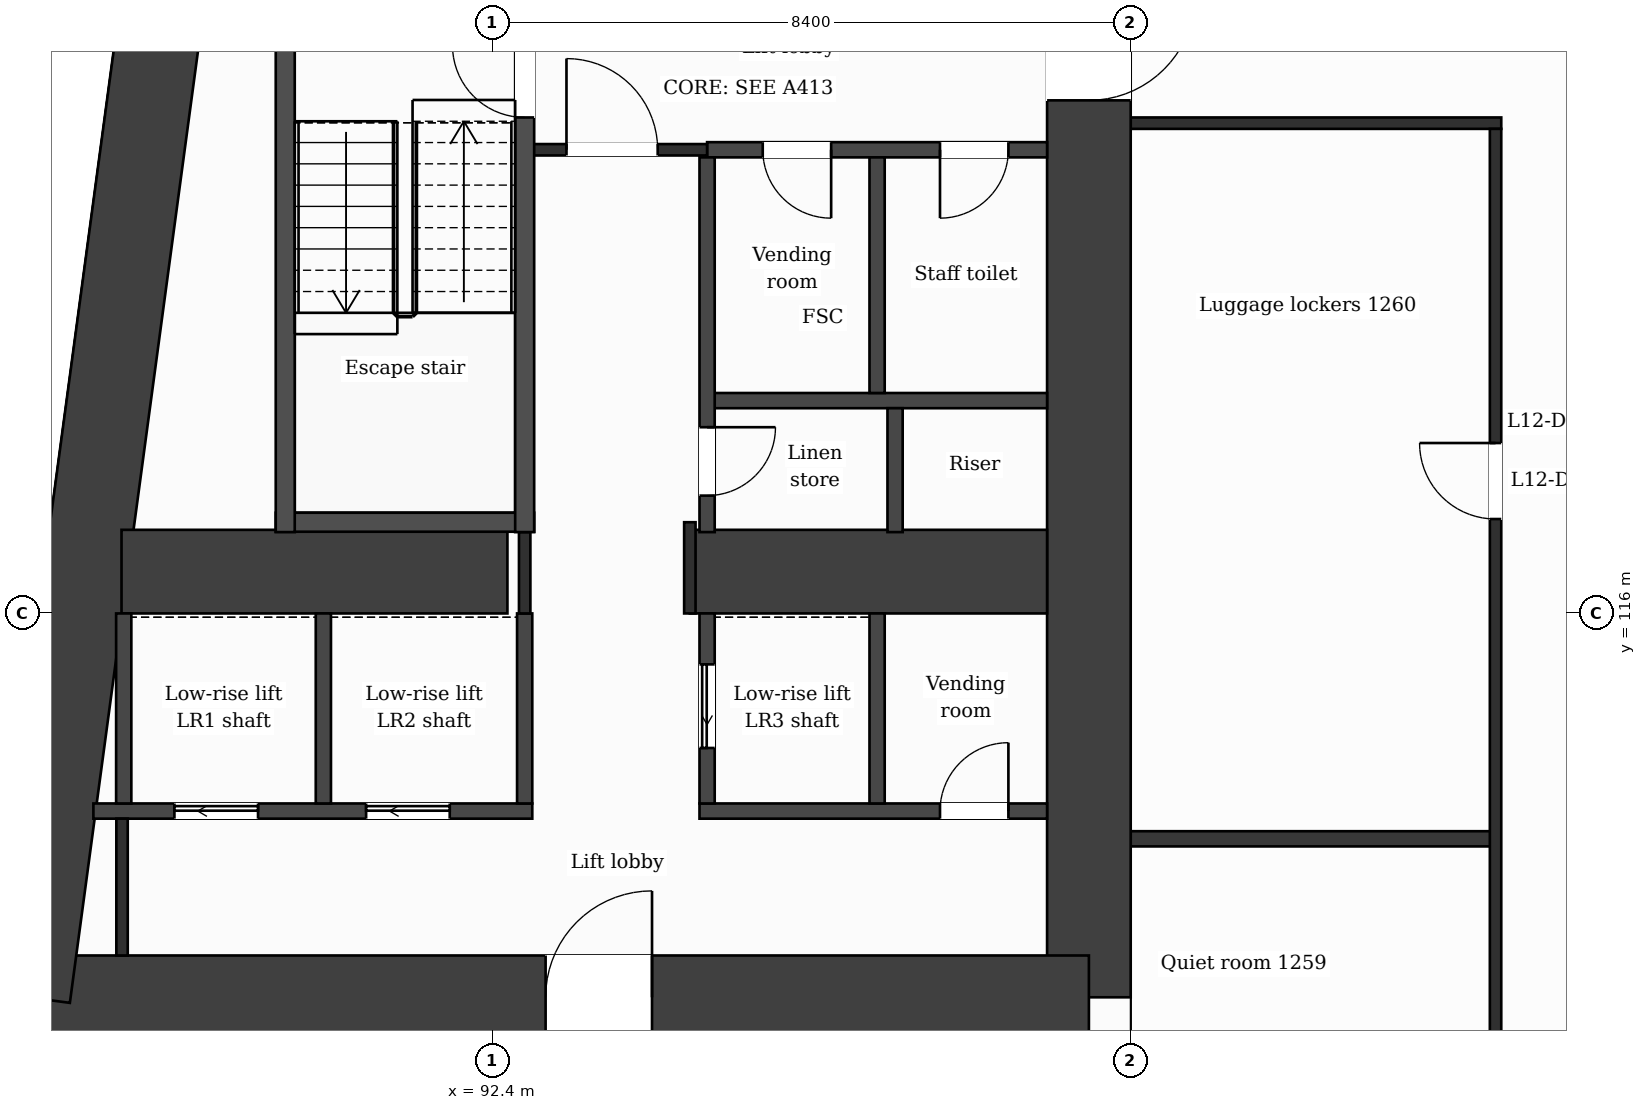
"""IFC4 building model, lengths in metres.
Left out: names, types, materials, properties, quantities, classifications, styles, units other than length and angle.
Written with IfcOpenShell. Run it as: python <this file> out.ifc"""

import sys

from ifc_helpers import new_model, si_unit, direction, frame, frame_2d, origin, place, context, subcontext, project, spatial, rectangle, extrude, element, fill, save


model = new_model("IFC4")
c1 = context("Model", 3, precision=1e-05, world=origin(), true_north=direction((0.0, 1.0)))
c2 = subcontext(c1, "Body", "Model", "MODEL_VIEW")
j1 = project(units=[si_unit("LENGTHUNIT", "METRE"), si_unit("PLANEANGLEUNIT", "RADIAN")], contexts=[c1])
p1 = place(None, origin())
s1 = spatial("IfcSite", under=j1, at=p1, CompositionType="ELEMENT")
p2 = place(p1, origin())
s2 = spatial("IfcBuilding", under=s1, at=p2, CompositionType="ELEMENT")
p3 = place(p2, frame((0.0, 0.0, 60.0)))
s3 = spatial("IfcBuildingStorey", under=s2, at=p3, CompositionType="ELEMENT", Elevation=60.0)
p4 = place(p3, frame((100.25, 131.85, 0.0), z_axis=(0.0, 0.0, 1.0), x_axis=(0.0, -1.0, 0.0)))
e1 = element("IfcWall", 1, at=p4, inside=s3, PredefinedType="SHEAR", context=c2, shape_type="SweptSolid", body=[
    extrude(rectangle(XDim=20.9, YDim=1.1, at=frame_2d((10.45, 0.0))), origin(), (0.0, 0.0, 1.0), 3.5),
])
p5 = place(p4, frame((7.7, 0.0, 0.0)))
e2 = element("IfcOpeningElement", 2, at=p5, cuts=e1, PredefinedType="OPENING", context=c2, shape_type="SweptSolid", body=[
    extrude(rectangle(XDim=1.4, YDim=2.1, at=frame_2d((0.7, 1.05))), frame((0.0, 0.56, 0.0), z_axis=(0.0, -1.0, 0.0), x_axis=(1.0, 0.0, 0.0)), (0.0, 0.0, 1.0), 1.12),
])
p6 = place(p3, frame((100.25, 110.95, 0.0), z_axis=(0.0, 0.0, 1.0), x_axis=(-1.0, 0.0, 0.0)))
e3 = element("IfcWall", 3, at=p6, inside=s3, PredefinedType="SHEAR", context=c2, shape_type="SweptSolid", body=[
    extrude(rectangle(XDim=13.952, YDim=1.1, at=frame_2d((6.976, 0.0))), origin(), (0.0, 0.0, 1.0), 3.5),
])
p7 = place(p6, frame((5.748, 0.0, 0.0)))
e4 = element("IfcOpeningElement", 4, at=p7, cuts=e3, PredefinedType="OPENING", context=c2, shape_type="SweptSolid", body=[
    extrude(rectangle(XDim=1.4, YDim=2.1, at=frame_2d((0.7, 1.05))), frame((0.0, 0.56, 0.0), z_axis=(0.0, -1.0, 0.0), x_axis=(1.0, 0.0, 0.0)), (0.0, 0.0, 1.0), 1.12),
])
p8 = place(p3, frame((86.298, 110.95, 0.0), z_axis=(0.0, 0.0, 1.0), x_axis=(0.133400422634, 0.99106222168, 0.0)))
e5 = element("IfcWall", 5, at=p8, inside=s3, PredefinedType="SHEAR", context=c2, shape_type="SweptSolid", body=[
    extrude(rectangle(XDim=21.089, YDim=1.1, at=frame_2d((10.544, 0.0))), origin(), (0.0, 0.0, 1.0), 3.5),
])
p9 = place(p3, frame((87.523, 116.55, 0.0), z_axis=(0.0, 0.0, 1.0), x_axis=(1.0, 0.0, 0.0)))
e6 = element("IfcWall", 6, at=p9, inside=s3, PredefinedType="SHEAR", context=c2, shape_type="SweptSolid", body=[
    extrude(rectangle(XDim=5.077, YDim=1.1, at=frame_2d((2.539, 0.0))), origin(), (0.0, 0.0, 1.0), 3.5),
])
p10 = place(p3, frame((95.0, 116.55, 0.0), z_axis=(0.0, 0.0, 1.0), x_axis=(1.0, 0.0, 0.0)))
e7 = element("IfcWall", 7, at=p10, inside=s3, PredefinedType="SHEAR", context=c2, shape_type="SweptSolid", body=[
    extrude(rectangle(XDim=4.7, YDim=1.1, at=frame_2d((2.35, 0.0))), origin(), (0.0, 0.0, 1.0), 3.5),
])
p11 = place(p3, frame((100.8, 113.035, 0.0), z_axis=(0.0, 0.0, 1.0), x_axis=(1.0, 0.0, 0.0)))
e8 = element("IfcWall", 8, at=p11, inside=s3, PredefinedType="PARTITIONING", context=c2, shape_type="SweptSolid", body=[
    extrude(rectangle(XDim=4.8, YDim=0.2, at=frame_2d((2.4, 0.0))), origin(), (0.0, 0.0, 1.0), 3.18),
])
p12 = place(p3, frame((87.153, 113.4, 0.0), z_axis=(0.0, 0.0, 1.0), x_axis=(1.0, 0.0, 0.0)))
e9 = element("IfcWall", 9, at=p12, inside=s3, PredefinedType="PARTITIONING", context=c2, shape_type="SweptSolid", body=[
    extrude(rectangle(XDim=5.774, YDim=0.2, at=frame_2d((2.887, 0.0))), origin(), (0.0, 0.0, 1.0), 3.18),
])
p13 = place(p12, frame((1.066, 0.0, 0.0)))
e10 = element("IfcOpeningElement", 10, at=p13, cuts=e9, PredefinedType="OPENING", context=c2, shape_type="SweptSolid", body=[
    extrude(rectangle(XDim=1.1, YDim=2.1, at=frame_2d((0.55, 1.05))), frame((0.0, 0.11, 0.0), z_axis=(0.0, -1.0, 0.0), x_axis=(1.0, 0.0, 0.0)), (0.0, 0.0, 1.0), 0.22),
])
p14 = place(p12, frame((3.588, 0.0, 0.0)))
e11 = element("IfcOpeningElement", 11, at=p14, cuts=e9, PredefinedType="OPENING", context=c2, shape_type="SweptSolid", body=[
    extrude(rectangle(XDim=1.1, YDim=2.1, at=frame_2d((0.55, 1.05))), frame((0.0, 0.11, 0.0), z_axis=(0.0, -1.0, 0.0), x_axis=(1.0, 0.0, 0.0)), (0.0, 0.0, 1.0), 0.22),
])
p15 = place(p3, frame((95.127, 113.4, 0.0), z_axis=(0.0, 0.0, 1.0), x_axis=(1.0, 0.0, 0.0)))
e12 = element("IfcWall", 12, at=p15, inside=s3, PredefinedType="PARTITIONING", context=c2, shape_type="SweptSolid", body=[
    extrude(rectangle(XDim=4.573, YDim=0.2, at=frame_2d((2.287, 0.0))), origin(), (0.0, 0.0, 1.0), 3.18),
])
p16 = place(p15, frame((3.164, 0.0, 0.0)))
e13 = element("IfcOpeningElement", 13, at=p16, cuts=e12, PredefinedType="OPENING", context=c2, shape_type="SweptSolid", body=[
    extrude(rectangle(XDim=0.9, YDim=2.1, at=frame_2d((0.45, 1.05))), frame((0.0, 0.11, 0.0), z_axis=(0.0, -1.0, 0.0), x_axis=(1.0, 0.0, 0.0)), (0.0, 0.0, 1.0), 0.22),
])
p17 = place(p3, frame((89.552, 117.2, 0.0), z_axis=(0.0, 0.0, 1.0), x_axis=(1.0, 0.0, 0.0)))
e14 = element("IfcWall", 14, at=p17, inside=s3, PredefinedType="PARTITIONING", context=c2, shape_type="SweptSolid", body=[
    extrude(rectangle(XDim=3.4, YDim=0.25, at=frame_2d((1.7, 0.0))), origin(), (0.0, 0.0, 1.0), 3.18),
])
p18 = place(p3, frame((95.227, 118.8, 0.0), z_axis=(0.0, 0.0, 1.0), x_axis=(1.0, 0.0, 0.0)))
e15 = element("IfcWall", 15, at=p18, inside=s3, PredefinedType="PARTITIONING", context=c2, shape_type="SweptSolid", body=[
    extrude(rectangle(XDim=4.473, YDim=0.2, at=frame_2d((2.236, 0.0))), origin(), (0.0, 0.0, 1.0), 3.18),
])
p19 = place(p3, frame((95.227, 122.1, 0.0), z_axis=(0.0, 0.0, 1.0), x_axis=(1.0, 0.0, 0.0)))
e16 = element("IfcWall", 16, at=p19, inside=s3, PredefinedType="PARTITIONING", context=c2, shape_type="SweptSolid", body=[
    extrude(rectangle(XDim=4.473, YDim=0.2, at=frame_2d((2.236, 0.0))), origin(), (0.0, 0.0, 1.0), 3.18),
])
p20 = place(p19, frame((0.732, 0.0, 0.0)))
e17 = element("IfcOpeningElement", 17, at=p20, cuts=e16, PredefinedType="OPENING", context=c2, shape_type="SweptSolid", body=[
    extrude(rectangle(XDim=0.9, YDim=2.1, at=frame_2d((0.45, 1.05))), frame((0.0, 0.11, 0.0), z_axis=(0.0, -1.0, 0.0), x_axis=(1.0, 0.0, 0.0)), (0.0, 0.0, 1.0), 0.22),
])
p21 = place(p19, frame((3.064, 0.0, 0.0)))
e18 = element("IfcOpeningElement", 18, at=p21, cuts=e16, PredefinedType="OPENING", context=c2, shape_type="SweptSolid", body=[
    extrude(rectangle(XDim=0.9, YDim=2.1, at=frame_2d((0.45, 1.05))), frame((0.0, 0.11, 0.0), z_axis=(0.0, -1.0, 0.0), x_axis=(1.0, 0.0, 0.0)), (0.0, 0.0, 1.0), 0.22),
])
p22 = place(p3, frame((92.827, 122.1, 0.0), z_axis=(0.0, 0.0, 1.0), x_axis=(1.0, 0.0, 0.0)))
e19 = element("IfcWall", 19, at=p22, inside=s3, PredefinedType="PARTITIONING", context=c2, shape_type="SweptSolid", body=[
    extrude(rectangle(XDim=2.4, YDim=0.15, at=frame_2d((1.2, 0.0))), origin(), (0.0, 0.0, 1.0), 3.18),
])
p23 = place(p22, frame((0.55, 0.0, 0.0)))
e20 = element("IfcOpeningElement", 20, at=p23, cuts=e19, PredefinedType="OPENING", context=c2, shape_type="SweptSolid", body=[
    extrude(rectangle(XDim=1.2, YDim=2.1, at=frame_2d((0.6, 1.05))), frame((0.0, 0.085, 0.0), z_axis=(0.0, -1.0, 0.0), x_axis=(1.0, 0.0, 0.0)), (0.0, 0.0, 1.0), 0.17),
])
p24 = place(p3, frame((100.8, 122.45, 0.0), z_axis=(0.0, 0.0, 1.0), x_axis=(1.0, 0.0, 0.0)))
e21 = element("IfcWall", 21, at=p24, inside=s3, PredefinedType="PARTITIONING", context=c2, shape_type="SweptSolid", body=[
    extrude(rectangle(XDim=4.875, YDim=0.15, at=frame_2d((2.438, 0.0))), origin(), (0.0, 0.0, 1.0), 3.18),
])
p25 = place(p3, frame((87.552, 113.5, 0.0), z_axis=(0.0, 0.0, 1.0), x_axis=(0.0, 1.0, 0.0)))
e22 = element("IfcWall", 22, at=p25, inside=s3, PredefinedType="PARTITIONING", context=c2, shape_type="SweptSolid", body=[
    extrude(rectangle(XDim=2.5, YDim=0.2, at=frame_2d((1.25, 0.0))), origin(), (0.0, 0.0, 1.0), 3.18),
])
p26 = place(p3, frame((87.53, 111.5, 0.0), z_axis=(0.0, 0.0, 1.0), x_axis=(0.0, 1.0, 0.0)))
e23 = element("IfcWall", 23, at=p26, inside=s3, PredefinedType="PARTITIONING", context=c2, shape_type="SweptSolid", body=[
    extrude(rectangle(XDim=1.8, YDim=0.15, at=frame_2d((0.9, 0.0))), origin(), (0.0, 0.0, 1.0), 3.18),
])
p27 = place(p3, frame((89.677, 117.07, 0.0), z_axis=(0.0, 0.0, 1.0), x_axis=(0.0, 1.0, 0.0)))
e24 = element("IfcWall", 24, at=p27, inside=s3, PredefinedType="PARTITIONING", context=c2, shape_type="SweptSolid", body=[
    extrude(rectangle(XDim=6.755, YDim=0.25, at=frame_2d((3.377, 0.0))), origin(), (0.0, 0.0, 1.0), 3.18),
])
for number, where, z_axis, x_axis in (
    (25, (90.178, 113.5, 0.0), (0.0, 0.0, 1.0), (0.0, 1.0, 0.0)),
    (26, (92.827, 113.5, 0.0), (0.0, 0.0, 1.0), (0.0, 1.0, 0.0)),
):
    element("IfcWall", number, at=place(p3, frame(where, z_axis=z_axis, x_axis=x_axis)), inside=s3, PredefinedType="PARTITIONING", context=c2, shape_type="SweptSolid", body=[
        extrude(rectangle(XDim=2.5, YDim=0.2, at=frame_2d((1.25, 0.0))), origin(), (0.0, 0.0, 1.0), 3.18),
    ])
p28 = place(p3, frame((92.827, 116.0, 0.0), z_axis=(0.0, 0.0, 1.0), x_axis=(0.0, 1.0, 0.0)))
e27 = element("IfcWall", 27, at=p28, inside=s3, PredefinedType="PARTITIONING", context=c2, shape_type="SweptSolid", body=[
    extrude(rectangle(XDim=1.07, YDim=0.15, at=frame_2d((0.535, 0.0))), origin(), (0.0, 0.0, 1.0), 3.18),
])
p29 = place(p3, frame((92.827, 117.07, 0.0), z_axis=(0.0, 0.0, 1.0), x_axis=(0.0, 1.0, 0.0)))
e28 = element("IfcWall", 28, at=p29, inside=s3, PredefinedType="PARTITIONING", context=c2, shape_type="SweptSolid", body=[
    extrude(rectangle(XDim=6.755, YDim=0.25, at=frame_2d((3.377, 0.0))), origin(), (0.0, 0.0, 1.0), 3.18),
])
p30 = place(p29, frame((5.455, 0.0, 0.0)))
e29 = element("IfcOpeningElement", 29, at=p30, cuts=e28, PredefinedType="OPENING", context=c2, shape_type="SweptSolid", body=[
    extrude(rectangle(XDim=0.95, YDim=2.1, at=frame_2d((0.475, 1.05))), frame((0.0, 0.135, 0.0), z_axis=(0.0, -1.0, 0.0), x_axis=(1.0, 0.0, 0.0)), (0.0, 0.0, 1.0), 0.27),
])
p31 = place(p3, frame((95.0, 116.0, 0.0), z_axis=(0.0, 0.0, 1.0), x_axis=(0.0, 1.0, 0.0)))
e30 = element("IfcWall", 30, at=p31, inside=s3, PredefinedType="PARTITIONING", context=c2, shape_type="SweptSolid", body=[
    extrude(rectangle(XDim=1.2, YDim=0.15, at=frame_2d((0.6, 0.0))), origin(), (0.0, 0.0, 1.0), 3.18),
])
p32 = place(p3, frame((95.227, 113.5, 0.0), z_axis=(0.0, 0.0, 1.0), x_axis=(0.0, 1.0, 0.0)))
e31 = element("IfcWall", 31, at=p32, inside=s3, PredefinedType="PARTITIONING", context=c2, shape_type="SweptSolid", body=[
    extrude(rectangle(XDim=2.5, YDim=0.2, at=frame_2d((1.25, 0.0))), origin(), (0.0, 0.0, 1.0), 3.18),
])
p33 = place(p32, frame((0.73, 0.0, 0.0)))
e32 = element("IfcOpeningElement", 32, at=p33, cuts=e31, PredefinedType="OPENING", context=c2, shape_type="SweptSolid", body=[
    extrude(rectangle(XDim=1.1, YDim=2.1, at=frame_2d((0.55, 1.05))), frame((0.0, 0.11, 0.0), z_axis=(0.0, -1.0, 0.0), x_axis=(1.0, 0.0, 0.0)), (0.0, 0.0, 1.0), 0.22),
])
p34 = place(p3, frame((95.227, 117.07, 0.0), z_axis=(0.0, 0.0, 1.0), x_axis=(0.0, 1.0, 0.0)))
e33 = element("IfcWall", 33, at=p34, inside=s3, PredefinedType="PARTITIONING", context=c2, shape_type="SweptSolid", body=[
    extrude(rectangle(XDim=4.93, YDim=0.2, at=frame_2d((2.465, 0.0))), origin(), (0.0, 0.0, 1.0), 3.18),
])
p35 = place(p34, frame((0.48, 0.0, 0.0)))
e34 = element("IfcOpeningElement", 34, at=p35, cuts=e33, PredefinedType="OPENING", context=c2, shape_type="SweptSolid", body=[
    extrude(rectangle(XDim=0.9, YDim=2.1, at=frame_2d((0.45, 1.05))), frame((0.0, 0.11, 0.0), z_axis=(0.0, -1.0, 0.0), x_axis=(1.0, 0.0, 0.0)), (0.0, 0.0, 1.0), 0.22),
])
p36 = place(p3, frame((97.463, 113.5, 0.0), z_axis=(0.0, 0.0, 1.0), x_axis=(0.0, 1.0, 0.0)))
e35 = element("IfcWall", 35, at=p36, inside=s3, PredefinedType="PARTITIONING", context=c2, shape_type="SweptSolid", body=[
    extrude(rectangle(XDim=2.5, YDim=0.2, at=frame_2d((1.25, 0.0))), origin(), (0.0, 0.0, 1.0), 3.18),
])
p37 = place(p3, frame((97.463, 118.9, 0.0), z_axis=(0.0, 0.0, 1.0), x_axis=(0.0, 1.0, 0.0)))
e36 = element("IfcWall", 36, at=p37, inside=s3, PredefinedType="PARTITIONING", context=c2, shape_type="SweptSolid", body=[
    extrude(rectangle(XDim=3.1, YDim=0.2, at=frame_2d((1.55, 0.0))), origin(), (0.0, 0.0, 1.0), 3.18),
])
p38 = place(p3, frame((97.7, 117.07, 0.0), z_axis=(0.0, 0.0, 1.0), x_axis=(0.0, 1.0, 0.0)))
e37 = element("IfcWall", 37, at=p38, inside=s3, PredefinedType="PARTITIONING", context=c2, shape_type="SweptSolid", body=[
    extrude(rectangle(XDim=1.63, YDim=0.2, at=frame_2d((0.815, 0.0))), origin(), (0.0, 0.0, 1.0), 3.18),
])
p39 = place(p3, frame((105.6, 109.075, 0.0), z_axis=(0.0, 0.0, 1.0), x_axis=(0.0, 1.0, 0.0)))
e38 = element("IfcWall", 38, at=p39, inside=s3, PredefinedType="PARTITIONING", context=c2, shape_type="SweptSolid", body=[
    extrude(rectangle(XDim=13.3, YDim=0.15, at=frame_2d((6.65, 0.0))), origin(), (0.0, 0.0, 1.0), 3.18),
])
p40 = place(p39, frame((8.167, 0.0, 0.0)))
e39 = element("IfcOpeningElement", 39, at=p40, cuts=e38, PredefinedType="OPENING", context=c2, shape_type="SweptSolid", body=[
    extrude(rectangle(XDim=1.0, YDim=2.1, at=frame_2d((0.5, 1.05))), frame((0.0, 0.085, 0.0), z_axis=(0.0, -1.0, 0.0), x_axis=(1.0, 0.0, 0.0)), (0.0, 0.0, 1.0), 0.17),
])
p41 = place(p23, origin())
e40 = element("IfcDoor", 40, at=p41, inside=s3, OperationType="SINGLE_SWING_LEFT", PredefinedType="DOOR", context=c2, shape_type="SweptSolid", body=[
    extrude(rectangle(XDim=1.2, YDim=2.1, at=frame_2d((0.6, 1.05))), frame((0.0, 0.025, 0.0), z_axis=(0.0, -1.0, 0.0), x_axis=(1.0, 0.0, 0.0)), (0.0, 0.0, 1.0), 0.05),
])
fill(e20, e40)
p42 = place(p20, origin())
e41 = element("IfcDoor", 41, at=p42, inside=s3, OperationType="SINGLE_SWING_RIGHT", PredefinedType="DOOR", context=c2, shape_type="SweptSolid", body=[
    extrude(rectangle(XDim=0.9, YDim=2.1, at=frame_2d((0.45, 1.05))), frame((0.0, 0.025, 0.0), z_axis=(0.0, -1.0, 0.0), x_axis=(1.0, 0.0, 0.0)), (0.0, 0.0, 1.0), 0.05),
])
fill(e17, e41)
p43 = place(p21, origin())
e42 = element("IfcDoor", 42, at=p43, inside=s3, OperationType="SINGLE_SWING_LEFT", PredefinedType="DOOR", context=c2, shape_type="SweptSolid", body=[
    extrude(rectangle(XDim=0.9, YDim=2.1, at=frame_2d((0.45, 1.05))), frame((0.0, 0.025, 0.0), z_axis=(0.0, -1.0, 0.0), x_axis=(1.0, 0.0, 0.0)), (0.0, 0.0, 1.0), 0.05),
])
fill(e18, e42)
p44 = place(p30, origin())
e43 = element("IfcDoor", 43, at=p44, inside=s3, OperationType="SINGLE_SWING_RIGHT", PredefinedType="DOOR", context=c2, shape_type="SweptSolid", body=[
    extrude(rectangle(XDim=0.95, YDim=2.1, at=frame_2d((0.475, 1.05))), frame((0.0, 0.025, 0.0), z_axis=(0.0, -1.0, 0.0), x_axis=(1.0, 0.0, 0.0)), (0.0, 0.0, 1.0), 0.05),
])
fill(e29, e43)
p45 = place(p35, origin())
e44 = element("IfcDoor", 44, at=p45, inside=s3, OperationType="SINGLE_SWING_RIGHT", PredefinedType="DOOR", context=c2, shape_type="SweptSolid", body=[
    extrude(rectangle(XDim=0.9, YDim=2.1, at=frame_2d((0.45, 1.05))), frame((0.0, 0.025, 0.0), z_axis=(0.0, -1.0, 0.0), x_axis=(1.0, 0.0, 0.0)), (0.0, 0.0, 1.0), 0.05),
])
fill(e34, e44)
p46 = place(p13, origin())
e45 = element("IfcDoor", 45, at=p46, inside=s3, OperationType="SLIDING_TO_LEFT", PredefinedType="DOOR", context=c2, shape_type="SweptSolid", body=[
    extrude(rectangle(XDim=1.1, YDim=2.1, at=frame_2d((0.55, 1.05))), frame((0.0, 0.025, 0.0), z_axis=(0.0, -1.0, 0.0), x_axis=(1.0, 0.0, 0.0)), (0.0, 0.0, 1.0), 0.05),
])
fill(e10, e45)
p47 = place(p14, origin())
e46 = element("IfcDoor", 46, at=p47, inside=s3, OperationType="SLIDING_TO_LEFT", PredefinedType="DOOR", context=c2, shape_type="SweptSolid", body=[
    extrude(rectangle(XDim=1.1, YDim=2.1, at=frame_2d((0.55, 1.05))), frame((0.0, 0.025, 0.0), z_axis=(0.0, -1.0, 0.0), x_axis=(1.0, 0.0, 0.0)), (0.0, 0.0, 1.0), 0.05),
])
fill(e11, e46)
p48 = place(p33, origin())
e47 = element("IfcDoor", 47, at=p48, inside=s3, OperationType="SLIDING_TO_LEFT", PredefinedType="DOOR", context=c2, shape_type="SweptSolid", body=[
    extrude(rectangle(XDim=1.1, YDim=2.1, at=frame_2d((0.55, 1.05))), frame((0.0, 0.025, 0.0), z_axis=(0.0, -1.0, 0.0), x_axis=(1.0, 0.0, 0.0)), (0.0, 0.0, 1.0), 0.05),
])
fill(e32, e47)
p49 = place(p16, origin())
e48 = element("IfcDoor", 48, at=p49, inside=s3, OperationType="SINGLE_SWING_RIGHT", PredefinedType="DOOR", context=c2, shape_type="SweptSolid", body=[
    extrude(rectangle(XDim=0.9, YDim=2.1, at=frame_2d((0.45, 1.05))), frame((0.0, 0.025, 0.0), z_axis=(0.0, -1.0, 0.0), x_axis=(1.0, 0.0, 0.0)), (0.0, 0.0, 1.0), 0.05),
])
fill(e13, e48)
p50 = place(p40, origin())
e49 = element("IfcDoor", 49, at=p50, inside=s3, OperationType="SINGLE_SWING_RIGHT", PredefinedType="DOOR", context=c2, shape_type="SweptSolid", body=[
    extrude(rectangle(XDim=1.0, YDim=2.1, at=frame_2d((0.5, 1.05))), frame((0.0, 0.025, 0.0), z_axis=(0.0, -1.0, 0.0), x_axis=(1.0, 0.0, 0.0)), (0.0, 0.0, 1.0), 0.05),
])
fill(e39, e49)
p51 = place(p7, origin())
e50 = element("IfcDoor", 50, at=p51, inside=s3, OperationType="SINGLE_SWING_LEFT", PredefinedType="DOOR", context=c2, shape_type="SweptSolid", body=[
    extrude(rectangle(XDim=1.4, YDim=2.1, at=frame_2d((0.7, 1.05))), frame((0.0, 0.025, 0.0), z_axis=(0.0, -1.0, 0.0), x_axis=(1.0, 0.0, 0.0)), (0.0, 0.0, 1.0), 0.05),
])
fill(e4, e50)
p52 = place(p5, origin())
e51 = element("IfcDoor", 51, at=p52, inside=s3, OperationType="SINGLE_SWING_LEFT", PredefinedType="DOOR", context=c2, shape_type="SweptSolid", body=[
    extrude(rectangle(XDim=1.4, YDim=2.1, at=frame_2d((0.7, 1.05))), frame((0.0, 0.025, 0.0), z_axis=(0.0, -1.0, 0.0), x_axis=(1.0, 0.0, 0.0)), (0.0, 0.0, 1.0), 0.05),
])
fill(e2, e51)
save(model, sys.argv[1])
